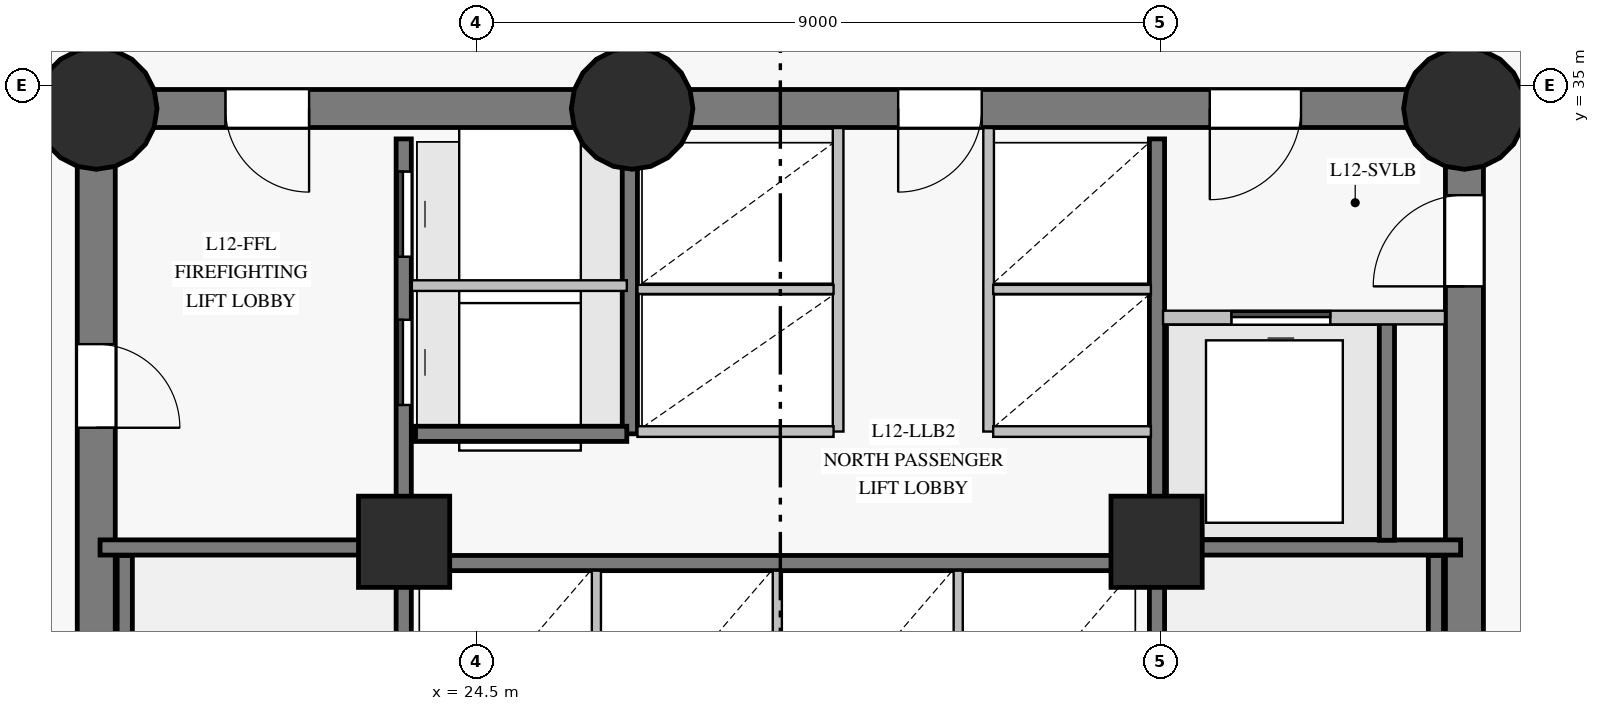
"""IFC4 building model, lengths in metres.
Left out: names, types, materials, properties, quantities, classifications, styles, units other than length and angle.
Written with IfcOpenShell. Run it as: python <this file> out.ifc"""

import sys

from ifc_helpers import new_model, si_unit, direction, frame, frame_2d, origin, origin_with_axes, origin_2d, place, context, subcontext, project, spatial, rectangle, circle, extrude, source, transform, mapped, element, fill, save


model = new_model("IFC4")
c1 = context("Model", 3, precision=1e-05, world=origin(), true_north=direction((0.0, 1.0)))
c2 = subcontext(c1, "Body", "Model", "MODEL_VIEW")
j1 = project(units=[si_unit("LENGTHUNIT", "METRE"), si_unit("PLANEANGLEUNIT", "RADIAN")], contexts=[c1])
p1 = place(None, origin())
s1 = spatial("IfcSite", under=j1, at=p1, CompositionType="ELEMENT")
p2 = place(p1, origin())
s2 = spatial("IfcBuilding", under=s1, at=p2, CompositionType="ELEMENT")
p3 = place(p2, frame((0.0, 0.0, 48.1)))
s3 = spatial("IfcBuildingStorey", under=s2, at=p3, CompositionType="ELEMENT", Elevation=48.1)
p4 = place(p3, frame((37.5, 18.3, 0.0), z_axis=(0.0, 0.0, 1.0), x_axis=(0.0, 1.0, 0.0)))
e1 = element("IfcWall", 1, at=p4, inside=s3, PredefinedType="SHEAR", context=c2, shape_type="SweptSolid", body=[
    extrude(rectangle(XDim=16.4, YDim=0.5, at=frame_2d((8.2, 0.0))), origin(), (0.0, 0.0, 1.0), 3.35),
])
p5 = place(p4, frame((14.06, 0.0, 0.0)))
e2 = element("IfcOpeningElement", 2, at=p5, cuts=e1, PredefinedType="OPENING", context=c2, shape_type="SweptSolid", body=[
    extrude(rectangle(XDim=1.2, YDim=2.15, at=frame_2d((0.6, 1.075))), frame((0.0, 0.26, 0.0), z_axis=(0.0, -1.0, 0.0), x_axis=(1.0, 0.0, 0.0)), (0.0, 0.0, 1.0), 0.52),
])
p6 = place(p3, frame((37.5, 34.7, 0.0), z_axis=(0.0, 0.0, 1.0), x_axis=(-1.0, 0.0, 0.0)))
e3 = element("IfcWall", 3, at=p6, inside=s3, PredefinedType="SHEAR", context=c2, shape_type="SweptSolid", body=[
    extrude(rectangle(XDim=10.95, YDim=0.5, at=frame_2d((5.475, 0.0))), origin(), (0.0, 0.0, 1.0), 3.35),
])
p7 = place(p6, frame((2.15, 0.0, 0.0)))
e4 = element("IfcOpeningElement", 4, at=p7, cuts=e3, PredefinedType="OPENING", context=c2, shape_type="SweptSolid", body=[
    extrude(rectangle(XDim=1.2, YDim=2.15, at=frame_2d((0.6, 1.075))), frame((0.0, 0.26, 0.0), z_axis=(0.0, -1.0, 0.0), x_axis=(1.0, 0.0, 0.0)), (0.0, 0.0, 1.0), 0.52),
])
p8 = place(p6, frame((6.35, 0.0, 0.0)))
e5 = element("IfcOpeningElement", 5, at=p8, cuts=e3, PredefinedType="OPENING", context=c2, shape_type="SweptSolid", body=[
    extrude(rectangle(XDim=1.1, YDim=2.15, at=frame_2d((0.55, 1.075))), frame((0.0, 0.26, 0.0), z_axis=(0.0, -1.0, 0.0), x_axis=(1.0, 0.0, 0.0)), (0.0, 0.0, 1.0), 0.52),
])
p9 = place(p3, frame((26.55, 34.7, 0.0), z_axis=(0.0, 0.0, 1.0), x_axis=(-1.0, 0.0, 0.0)))
e6 = element("IfcWall", 6, at=p9, inside=s3, PredefinedType="SHEAR", context=c2, shape_type="SweptSolid", body=[
    extrude(rectangle(XDim=7.05, YDim=0.5, at=frame_2d((3.525, 0.0))), origin(), (0.0, 0.0, 1.0), 3.35),
])
p10 = place(p9, frame((4.25, 0.0, 0.0)))
e7 = element("IfcOpeningElement", 7, at=p10, cuts=e6, PredefinedType="OPENING", context=c2, shape_type="SweptSolid", body=[
    extrude(rectangle(XDim=1.1, YDim=2.15, at=frame_2d((0.55, 1.075))), frame((0.0, 0.26, 0.0), z_axis=(0.0, -1.0, 0.0), x_axis=(1.0, 0.0, 0.0)), (0.0, 0.0, 1.0), 0.52),
])
p11 = place(p3, frame((19.5, 34.7, 0.0), z_axis=(0.0, 0.0, 1.0), x_axis=(0.0, -1.0, 0.0)))
e8 = element("IfcWall", 8, at=p11, inside=s3, PredefinedType="SHEAR", context=c2, shape_type="SweptSolid", body=[
    extrude(rectangle(XDim=16.4, YDim=0.5, at=frame_2d((8.2, 0.0))), origin(), (0.0, 0.0, 1.0), 3.35),
])
p12 = place(p11, frame((3.1, 0.0, 0.0)))
e9 = element("IfcOpeningElement", 9, at=p12, cuts=e8, PredefinedType="OPENING", context=c2, shape_type="SweptSolid", body=[
    extrude(rectangle(XDim=1.1, YDim=2.15, at=frame_2d((0.55, 1.075))), frame((0.0, 0.26, 0.0), z_axis=(0.0, -1.0, 0.0), x_axis=(1.0, 0.0, 0.0)), (0.0, 0.0, 1.0), 0.52),
])
m1 = source(origin_with_axes(), c2, "Body", "SweptSolid", [
    extrude(circle(Radius=0.8, at=origin_2d()), origin(), (0.0, 0.0, 1.0), 3.6),
])
for number, where, z_axis, x_axis in (
    (10, (19.5, 34.7, 0.0), (0.0, 0.0, 1.0), (1.0, 0.0, 0.0)),
    (11, (26.55, 34.7, 0.0), (0.0, 0.0, 1.0), (1.0, 0.0, 0.0)),
    (12, (37.5, 34.7, 0.0), (0.0, 0.0, 1.0), (1.0, 0.0, 0.0)),
):
    element("IfcColumn", number, at=place(p3, frame(where, z_axis=z_axis, x_axis=x_axis)), inside=s3, PredefinedType="COLUMN", context=c2, shape_type="MappedRepresentation", body=[
        mapped(m1, transform((0.0, 0.0, 0.0), scale=1.0)),
    ])
m2 = source(origin_with_axes(), c2, "Body", "SweptSolid", [
    extrude(rectangle(XDim=1.2, YDim=1.2, at=origin_2d()), origin(), (0.0, 0.0, 1.0), 3.6),
])
for number, where, z_axis, x_axis in (
    (13, (23.55, 29.0, 0.0), (0.0, 0.0, 1.0), (1.0, 0.0, 0.0)),
    (14, (33.45, 29.0, 0.0), (0.0, 0.0, 1.0), (1.0, 0.0, 0.0)),
):
    element("IfcColumn", number, at=place(p3, frame(where, z_axis=z_axis, x_axis=x_axis)), inside=s3, PredefinedType="COLUMN", context=c2, shape_type="MappedRepresentation", body=[
        mapped(m2, transform((0.0, 0.0, 0.0), scale=1.0)),
    ])
p13 = place(p3, frame((23.545, 18.7, 0.0), z_axis=(0.0, 0.0, 1.0), x_axis=(0.0, 1.0, 0.0)))
e15 = element("IfcWall", 15, at=p13, inside=s3, PredefinedType="SHEAR", context=c2, shape_type="SweptSolid", body=[
    extrude(rectangle(XDim=15.6, YDim=0.2, at=frame_2d((7.8, 0.0))), origin(), (0.0, 0.0, 1.0), 3.35),
])
p14 = place(p13, frame((2.75, 0.0, 0.0)))
e16 = element("IfcOpeningElement", 16, at=p14, cuts=e15, PredefinedType="OPENING", context=c2, shape_type="SweptSolid", body=[
    extrude(rectangle(XDim=1.15, YDim=2.15, at=frame_2d((0.575, 1.075))), frame((0.0, 0.11, 0.0), z_axis=(0.0, -1.0, 0.0), x_axis=(1.0, 0.0, 0.0)), (0.0, 0.0, 1.0), 0.22),
])
p15 = place(p13, frame((0.14, 0.0, 0.0)))
e17 = element("IfcOpeningElement", 17, at=p15, cuts=e15, PredefinedType="OPENING", context=c2, shape_type="SweptSolid", body=[
    extrude(rectangle(XDim=0.88, YDim=2.1, at=frame_2d((0.44, 1.05))), frame((0.0, 0.11, 0.0), z_axis=(0.0, -1.0, 0.0), x_axis=(1.0, 0.0, 0.0)), (0.0, 0.0, 1.0), 0.22),
])
p16 = place(p13, frame((1.36, 0.0, 0.0)))
e18 = element("IfcOpeningElement", 18, at=p16, cuts=e15, PredefinedType="OPENING", context=c2, shape_type="SweptSolid", body=[
    extrude(rectangle(XDim=0.88, YDim=2.1, at=frame_2d((0.44, 1.05))), frame((0.0, 0.11, 0.0), z_axis=(0.0, -1.0, 0.0), x_axis=(1.0, 0.0, 0.0)), (0.0, 0.0, 1.0), 0.22),
])
p17 = place(p13, frame((12.1, 0.0, 0.0)))
e19 = element("IfcOpeningElement", 19, at=p17, cuts=e15, PredefinedType="OPENING", context=c2, shape_type="SweptSolid", body=[
    extrude(rectangle(XDim=1.12, YDim=2.15, at=frame_2d((0.56, 1.075))), frame((0.0, 0.11, 0.0), z_axis=(0.0, -1.0, 0.0), x_axis=(1.0, 0.0, 0.0)), (0.0, 0.0, 1.0), 0.22),
])
p18 = place(p13, frame((14.05, 0.0, 0.0)))
e20 = element("IfcOpeningElement", 20, at=p18, cuts=e15, PredefinedType="OPENING", context=c2, shape_type="SweptSolid", body=[
    extrude(rectangle(XDim=1.12, YDim=2.15, at=frame_2d((0.56, 1.075))), frame((0.0, 0.11, 0.0), z_axis=(0.0, -1.0, 0.0), x_axis=(1.0, 0.0, 0.0)), (0.0, 0.0, 1.0), 0.22),
])
p19 = place(p3, frame((33.455, 18.7, 0.0), z_axis=(0.0, 0.0, 1.0), x_axis=(0.0, 1.0, 0.0)))
e21 = element("IfcWall", 21, at=p19, inside=s3, PredefinedType="SHEAR", context=c2, shape_type="SweptSolid", body=[
    extrude(rectangle(XDim=15.6, YDim=0.2, at=frame_2d((7.8, 0.0))), origin(), (0.0, 0.0, 1.0), 3.35),
])
p20 = place(p19, frame((2.75, 0.0, 0.0)))
e22 = element("IfcOpeningElement", 22, at=p20, cuts=e21, PredefinedType="OPENING", context=c2, shape_type="SweptSolid", body=[
    extrude(rectangle(XDim=1.15, YDim=2.15, at=frame_2d((0.575, 1.075))), frame((0.0, 0.11, 0.0), z_axis=(0.0, -1.0, 0.0), x_axis=(1.0, 0.0, 0.0)), (0.0, 0.0, 1.0), 0.22),
])
p21 = place(p19, frame((0.55, 0.0, 0.0)))
e23 = element("IfcOpeningElement", 23, at=p21, cuts=e21, PredefinedType="OPENING", context=c2, shape_type="SweptSolid", body=[
    extrude(rectangle(XDim=0.94, YDim=2.1, at=frame_2d((0.47, 1.05))), frame((0.0, 0.11, 0.0), z_axis=(0.0, -1.0, 0.0), x_axis=(1.0, 0.0, 0.0)), (0.0, 0.0, 1.0), 0.22),
])
p22 = place(p3, frame((23.7, 28.72, 0.0), z_axis=(0.0, 0.0, 1.0), x_axis=(1.0, 0.0, 0.0)))
e24 = element("IfcWall", 24, at=p22, inside=s3, PredefinedType="SHEAR", context=c2, shape_type="SweptSolid", body=[
    extrude(rectangle(XDim=9.6, YDim=0.2, at=frame_2d((4.8, 0.0))), origin(), (0.0, 0.0, 1.0), 3.35),
])
for number, where, z_axis, x_axis in (
    (25, (19.875, 21.32, 0.0), (0.0, 0.0, 1.0), (0.0, 1.0, 0.0)),
    (26, (37.125, 21.32, 0.0), (0.0, 0.0, 1.0), (0.0, 1.0, 0.0)),
):
    element("IfcWall", number, at=place(p3, frame(where, z_axis=z_axis, x_axis=x_axis)), inside=s3, PredefinedType="SHEAR", context=c2, shape_type="SweptSolid", body=[
        extrude(rectangle(XDim=7.5, YDim=0.2, at=frame_2d((3.75, 0.0))), origin(), (0.0, 0.0, 1.0), 3.35),
    ])
for number, where, z_axis, x_axis in (
    (27, (33.455, 28.925, 0.0), (0.0, 0.0, 1.0), (1.0, 0.0, 0.0)),
    (28, (19.55, 28.925, 0.0), (0.0, 0.0, 1.0), (1.0, 0.0, 0.0)),
):
    element("IfcWall", number, at=place(p3, frame(where, z_axis=z_axis, x_axis=x_axis)), inside=s3, PredefinedType="SHEAR", context=c2, shape_type="SweptSolid", body=[
        extrude(rectangle(XDim=3.995, YDim=0.2, at=frame_2d((1.998, 0.0))), origin(), (0.0, 0.0, 1.0), 3.35),
    ])
p23 = place(p3, frame((26.52, 30.42, 0.0), z_axis=(0.0, 0.0, 1.0), x_axis=(0.0, 1.0, 0.0)))
e29 = element("IfcWall", 29, at=p23, inside=s3, PredefinedType="SHEAR", context=c2, shape_type="SweptSolid", body=[
    extrude(rectangle(XDim=3.86, YDim=0.2, at=frame_2d((1.93, 0.0))), origin(), (0.0, 0.0, 1.0), 3.35),
])
p24 = place(p3, frame((36.48, 29.02, 0.0), z_axis=(0.0, 0.0, 1.0), x_axis=(0.0, 1.0, 0.0)))
e30 = element("IfcWall", 30, at=p24, inside=s3, PredefinedType="SHEAR", context=c2, shape_type="SweptSolid", body=[
    extrude(rectangle(XDim=2.86, YDim=0.2, at=frame_2d((1.43, 0.0))), origin(), (0.0, 0.0, 1.0), 3.35),
])
p25 = place(p3, frame((23.7, 30.42, 0.0), z_axis=(0.0, 0.0, 1.0), x_axis=(1.0, 0.0, 0.0)))
e31 = element("IfcWall", 31, at=p25, inside=s3, PredefinedType="SHEAR", context=c2, shape_type="SweptSolid", body=[
    extrude(rectangle(XDim=2.78, YDim=0.2, at=frame_2d((1.39, 0.0))), origin(), (0.0, 0.0, 1.0), 3.35),
])
for number, where, z_axis, x_axis in (
    (32, (29.26, 30.45, 0.0), (0.0, 0.0, 1.0), (0.0, 1.0, 0.0)),
    (33, (31.24, 30.45, 0.0), (0.0, 0.0, 1.0), (0.0, 1.0, 0.0)),
):
    element("IfcWall", number, at=place(p3, frame(where, z_axis=z_axis, x_axis=x_axis)), inside=s3, PredefinedType="PARTITIONING", context=c2, shape_type="SweptSolid", body=[
        extrude(rectangle(XDim=3.993, YDim=0.14, at=frame_2d((1.997, 0.0))), origin(), (0.0, 0.0, 1.0), 3.35),
    ])
p26 = place(p3, frame((33.535, 31.95, 0.0), z_axis=(0.0, 0.0, 1.0), x_axis=(1.0, 0.0, 0.0)))
e34 = element("IfcWall", 34, at=p26, inside=s3, PredefinedType="PARTITIONING", context=c2, shape_type="SweptSolid", body=[
    extrude(rectangle(XDim=3.709, YDim=0.18, at=frame_2d((1.854, 0.0))), origin(), (0.0, 0.0, 1.0), 3.35),
])
p27 = place(p26, frame((0.9, 0.0, 0.0)))
e35 = element("IfcOpeningElement", 35, at=p27, cuts=e34, PredefinedType="OPENING", context=c2, shape_type="SweptSolid", body=[
    extrude(rectangle(XDim=1.3, YDim=2.2, at=frame_2d((0.65, 1.1))), frame((0.0, 0.1, 0.0), z_axis=(0.0, -1.0, 0.0), x_axis=(1.0, 0.0, 0.0)), (0.0, 0.0, 1.0), 0.2),
])
p28 = place(p3, frame((23.652, 32.37, 0.0), z_axis=(0.0, 0.0, 1.0), x_axis=(1.0, 0.0, 0.0)))
e36 = element("IfcWall", 36, at=p28, inside=s3, PredefinedType="PARTITIONING", context=c2, shape_type="SweptSolid", body=[
    extrude(rectangle(XDim=2.828, YDim=0.14, at=frame_2d((1.414, 0.0))), origin(), (0.0, 0.0, 1.0), 3.35),
])
for number, where, z_axis, x_axis in (
    (37, (26.08, 26.02, 0.0), (0.0, 0.0, 1.0), (0.0, 1.0, 0.0)),
    (38, (28.46, 26.02, 0.0), (0.0, 0.0, 1.0), (0.0, 1.0, 0.0)),
    (39, (30.84, 26.02, 0.0), (0.0, 0.0, 1.0), (0.0, 1.0, 0.0)),
):
    element("IfcWall", number, at=place(p3, frame(where, z_axis=z_axis, x_axis=x_axis)), inside=s3, PredefinedType="PARTITIONING", context=c2, shape_type="SweptSolid", body=[
        extrude(rectangle(XDim=2.6, YDim=0.12, at=frame_2d((1.3, 0.0))), origin(), (0.0, 0.0, 1.0), 3.35),
    ])
p29 = place(p3, frame((26.62, 30.45, 0.0), z_axis=(0.0, 0.0, 1.0), x_axis=(1.0, 0.0, 0.0)))
e40 = element("IfcWall", 40, at=p29, inside=s3, PredefinedType="PARTITIONING", context=c2, shape_type="SweptSolid", body=[
    extrude(rectangle(XDim=2.58, YDim=0.14, at=frame_2d((1.29, 0.0))), origin(), (0.0, 0.0, 1.0), 3.35),
])
p30 = place(p3, frame((26.62, 32.32, 0.0), z_axis=(0.0, 0.0, 1.0), x_axis=(1.0, 0.0, 0.0)))
e41 = element("IfcWall", 41, at=p30, inside=s3, PredefinedType="PARTITIONING", context=c2, shape_type="SweptSolid", body=[
    extrude(rectangle(XDim=2.58, YDim=0.12, at=frame_2d((1.29, 0.0))), origin(), (0.0, 0.0, 1.0), 3.35),
])
p31 = place(p3, frame((31.3, 30.45, 0.0), z_axis=(0.0, 0.0, 1.0), x_axis=(1.0, 0.0, 0.0)))
e42 = element("IfcWall", 42, at=p31, inside=s3, PredefinedType="PARTITIONING", context=c2, shape_type="SweptSolid", body=[
    extrude(rectangle(XDim=2.075, YDim=0.14, at=frame_2d((1.038, 0.0))), origin(), (0.0, 0.0, 1.0), 3.35),
])
p32 = place(p3, frame((31.3, 32.32, 0.0), z_axis=(0.0, 0.0, 1.0), x_axis=(1.0, 0.0, 0.0)))
e43 = element("IfcWall", 43, at=p32, inside=s3, PredefinedType="PARTITIONING", context=c2, shape_type="SweptSolid", body=[
    extrude(rectangle(XDim=2.075, YDim=0.12, at=frame_2d((1.038, 0.0))), origin(), (0.0, 0.0, 1.0), 3.35),
])
m3 = source(origin_with_axes(), c2, "Body", "SweptSolid", [
    extrude(rectangle(XDim=1.1, YDim=2.15, at=frame_2d((0.55, 1.075))), frame((0.0, 0.025, 0.0), z_axis=(0.0, -1.0, 0.0), x_axis=(1.0, 0.0, 0.0)), (0.0, 0.0, 1.0), 0.05),
])
p33 = place(p10, origin())
e44 = element("IfcDoor", 44, at=p33, inside=s3, OperationType="SINGLE_SWING_LEFT", PredefinedType="DOOR", context=c2, shape_type="MappedRepresentation", body=[
    mapped(m3, transform((0.0, 0.0, 0.0), scale=1.0)),
])
fill(e7, e44)
p34 = place(p12, origin())
e45 = element("IfcDoor", 45, at=p34, inside=s3, OperationType="SINGLE_SWING_RIGHT", PredefinedType="DOOR", context=c2, shape_type="MappedRepresentation", body=[
    mapped(m3, transform((0.0, 0.0, 0.0), scale=1.0)),
])
fill(e9, e45)
m4 = source(origin_with_axes(), c2, "Body", "SweptSolid", [
    extrude(rectangle(XDim=1.2, YDim=2.15, at=frame_2d((0.6, 1.075))), frame((0.0, 0.025, 0.0), z_axis=(0.0, -1.0, 0.0), x_axis=(1.0, 0.0, 0.0)), (0.0, 0.0, 1.0), 0.05),
])
p35 = place(p5, origin())
e46 = element("IfcDoor", 46, at=p35, inside=s3, OperationType="SINGLE_SWING_LEFT", PredefinedType="DOOR", context=c2, shape_type="MappedRepresentation", body=[
    mapped(m4, transform((0.0, 0.0, 0.0), scale=1.0)),
])
fill(e2, e46)
p36 = place(p7, origin())
e47 = element("IfcDoor", 47, at=p36, inside=s3, OperationType="SINGLE_SWING_RIGHT", PredefinedType="DOOR", context=c2, shape_type="MappedRepresentation", body=[
    mapped(m4, transform((0.0, 0.0, 0.0), scale=1.0)),
])
fill(e4, e47)
m5 = source(origin_with_axes(), c2, "Body", "SweptSolid", [
    extrude(rectangle(XDim=1.3, YDim=2.2, at=frame_2d((0.65, 1.1))), frame((0.0, 0.025, 0.0), z_axis=(0.0, -1.0, 0.0), x_axis=(1.0, 0.0, 0.0)), (0.0, 0.0, 1.0), 0.05),
])
p37 = place(p27, origin())
e48 = element("IfcDoor", 48, at=p37, inside=s3, OperationType="SLIDING_TO_LEFT", PredefinedType="DOOR", context=c2, shape_type="MappedRepresentation", body=[
    mapped(m5, transform((0.0, 0.0, 0.0), scale=1.0)),
])
fill(e35, e48)
p38 = place(p8, origin())
e49 = element("IfcDoor", 49, at=p38, inside=s3, OperationType="SINGLE_SWING_RIGHT", PredefinedType="DOOR", context=c2, shape_type="MappedRepresentation", body=[
    mapped(m3, transform((0.0, 0.0, 0.0), scale=1.0)),
])
fill(e5, e49)
m6 = source(origin_with_axes(), c2, "Body", "SweptSolid", [
    extrude(rectangle(XDim=1.12, YDim=2.15, at=frame_2d((0.56, 1.075))), frame((0.0, 0.025, 0.0), z_axis=(0.0, -1.0, 0.0), x_axis=(1.0, 0.0, 0.0)), (0.0, 0.0, 1.0), 0.05),
])
p39 = place(p17, origin())
e50 = element("IfcDoor", 50, at=p39, inside=s3, OperationType="SLIDING_TO_LEFT", PredefinedType="DOOR", context=c2, shape_type="MappedRepresentation", body=[
    mapped(m6, transform((0.0, 0.0, 0.0), scale=1.0)),
])
fill(e19, e50)
p40 = place(p18, origin())
e51 = element("IfcDoor", 51, at=p40, inside=s3, OperationType="SLIDING_TO_RIGHT", PredefinedType="DOOR", context=c2, shape_type="MappedRepresentation", body=[
    mapped(m6, transform((0.0, 0.0, 0.0), scale=1.0)),
])
fill(e20, e51)
save(model, sys.argv[1])
